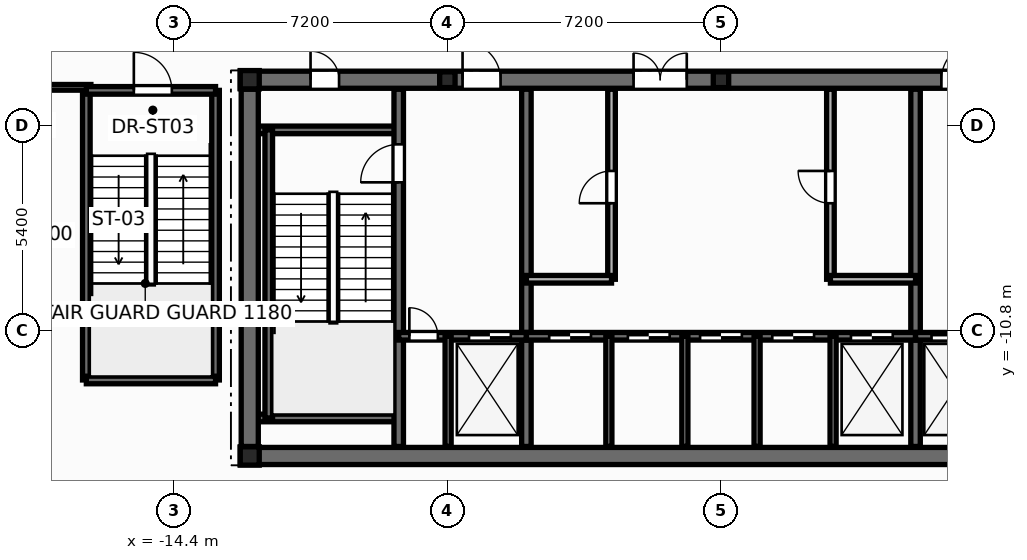
"""IFC4 building model, lengths in metres.
Left out: names, types, materials, properties, quantities, classifications, styles, units other than length and angle.
Written with IfcOpenShell. Run it as: python <this file> out.ifc"""

import sys

from ifc_helpers import new_model, si_unit, direction, frame, frame_2d, origin, origin_2d, place, context, subcontext, project, spatial, rectangle, i_section, extrude, element, fill, save


model = new_model("IFC4")
c1 = context("Model", 3, precision=1e-05, world=origin(), true_north=direction((0.0, 1.0)))
c2 = subcontext(c1, "Body", "Model", "MODEL_VIEW")
j1 = project(units=[si_unit("LENGTHUNIT", "METRE"), si_unit("PLANEANGLEUNIT", "RADIAN")], contexts=[c1])
p1 = place(None, origin())
s1 = spatial("IfcSite", under=j1, at=p1, CompositionType="ELEMENT")
p2 = place(p1, origin())
s2 = spatial("IfcBuilding", under=s1, at=p2, CompositionType="ELEMENT")
p3 = place(p2, frame((0.0, 0.0, -4.8)))
s3 = spatial("IfcBuildingStorey", under=s2, at=p3, CompositionType="ELEMENT", Elevation=-4.8)
for number, where, z_axis, x_axis in (
    (1, (-12.4, -14.1, 0.0), (0.0, 0.0, 1.0), (1.0, 0.0, 0.0)),
    (2, (-12.4, -4.2, 0.0), (0.0, 0.0, 1.0), (1.0, 0.0, 0.0)),
):
    element("IfcColumn", number, at=place(p3, frame(where, z_axis=z_axis, x_axis=x_axis)), inside=s3, PredefinedType="COLUMN", context=c2, shape_type="SweptSolid", body=[
        extrude(i_section(OverallWidth=0.5, OverallDepth=0.482, WebThickness=0.04, FlangeThickness=0.045, at=origin_2d()), origin(), (0.0, 0.0, 1.0), 4.8),
    ])
for number, where, z_axis, x_axis in (
    (3, (-7.2, -4.2, 0.0), (0.0, 0.0, 1.0), (1.0, 0.0, 0.0)),
    (4, (0.0, -4.2, 0.0), (0.0, 0.0, 1.0), (1.0, 0.0, 0.0)),
):
    element("IfcColumn", number, at=place(p3, frame(where, z_axis=z_axis, x_axis=x_axis)), inside=s3, PredefinedType="PILASTER", context=c2, shape_type="SweptSolid", body=[
        extrude(i_section(OverallWidth=0.405, OverallDepth=0.414, WebThickness=0.022, FlangeThickness=0.032, at=origin_2d()), origin(), (0.0, 0.0, 1.0), 4.8),
    ])
p4 = place(p3, frame((-12.65, -14.1, 0.0), z_axis=(0.0, 0.0, 1.0), x_axis=(1.0, 0.0, 0.0)))
e5 = element("IfcWall", 5, at=p4, inside=s3, PredefinedType="SHEAR", context=c2, shape_type="SweptSolid", body=[
    extrude(rectangle(XDim=25.3, YDim=0.45, at=frame_2d((12.65, 0.0))), origin(), (0.0, 0.0, 1.0), 4.8),
])
p5 = place(p3, frame((-12.65, -4.2, 0.0), z_axis=(0.0, 0.0, 1.0), x_axis=(1.0, 0.0, 0.0)))
e6 = element("IfcWall", 6, at=p5, inside=s3, PredefinedType="SHEAR", context=c2, shape_type="SweptSolid", body=[
    extrude(rectangle(XDim=25.3, YDim=0.45, at=frame_2d((12.65, 0.0))), origin(), (0.0, 0.0, 1.0), 4.8),
])
p6 = place(p5, frame((1.85, 0.0, 0.0)))
e7 = element("IfcOpeningElement", 7, at=p6, cuts=e6, PredefinedType="OPENING", context=c2, shape_type="SweptSolid", body=[
    extrude(rectangle(XDim=0.756, YDim=2.054, at=frame_2d((0.375, 1.027))), frame((0.0, 0.235, 0.0), z_axis=(0.0, -1.0, 0.0), x_axis=(1.0, 0.0, 0.0)), (0.0, 0.0, 1.0), 0.47),
])
p7 = place(p5, frame((22.65, 0.0, 0.0)))
e8 = element("IfcOpeningElement", 8, at=p7, cuts=e6, PredefinedType="OPENING", context=c2, shape_type="SweptSolid", body=[
    extrude(rectangle(XDim=0.756, YDim=2.054, at=frame_2d((0.375, 1.027))), frame((0.0, 0.235, 0.0), z_axis=(0.0, -1.0, 0.0), x_axis=(1.0, 0.0, 0.0)), (0.0, 0.0, 1.0), 0.47),
])
p8 = place(p5, frame((5.85, 0.0, 0.0)))
e9 = element("IfcOpeningElement", 9, at=p8, cuts=e6, PredefinedType="OPENING", context=c2, shape_type="SweptSolid", body=[
    extrude(rectangle(XDim=1.006, YDim=2.104, at=frame_2d((0.5, 1.052))), frame((0.0, 0.235, 0.0), z_axis=(0.0, -1.0, 0.0), x_axis=(1.0, 0.0, 0.0)), (0.0, 0.0, 1.0), 0.47),
])
p9 = place(p5, frame((10.35, 0.0, 0.0)))
e10 = element("IfcOpeningElement", 10, at=p9, cuts=e6, PredefinedType="OPENING", context=c2, shape_type="SweptSolid", body=[
    extrude(rectangle(XDim=1.406, YDim=2.154, at=frame_2d((0.7, 1.077))), frame((0.0, 0.235, 0.0), z_axis=(0.0, -1.0, 0.0), x_axis=(1.0, 0.0, 0.0)), (0.0, 0.0, 1.0), 0.47),
])
p10 = place(p5, frame((18.45, 0.0, 0.0)))
e11 = element("IfcOpeningElement", 11, at=p10, cuts=e6, PredefinedType="OPENING", context=c2, shape_type="SweptSolid", body=[
    extrude(rectangle(XDim=1.006, YDim=2.104, at=frame_2d((0.5, 1.052))), frame((0.0, 0.235, 0.0), z_axis=(0.0, -1.0, 0.0), x_axis=(1.0, 0.0, 0.0)), (0.0, 0.0, 1.0), 0.47),
])
for number, where, z_axis, x_axis in (
    (12, (-12.35, -5.52, 0.0), (0.0, 0.0, 1.0), (1.0, 0.0, 0.0)),
    (13, (-12.35, -13.1, 0.0), (0.0, 0.0, 1.0), (1.0, 0.0, 0.0)),
):
    element("IfcWall", number, at=place(p3, frame(where, z_axis=z_axis, x_axis=x_axis)), inside=s3, PredefinedType="SOLIDWALL", context=c2, shape_type="SweptSolid", body=[
        extrude(rectangle(XDim=3.87, YDim=0.2, at=frame_2d((1.935, 0.0))), origin(), (0.0, 0.0, 1.0), 4.8),
    ])
p11 = place(p3, frame((-11.9, -13.1, 0.0), z_axis=(0.0, 0.0, 1.0), x_axis=(0.0, 1.0, 0.0)))
e14 = element("IfcWall", 14, at=p11, inside=s3, PredefinedType="SOLIDWALL", context=c2, shape_type="SweptSolid", body=[
    extrude(rectangle(XDim=7.58, YDim=0.2, at=frame_2d((3.79, 0.0))), origin(), (0.0, 0.0, 1.0), 4.8),
])
p12 = place(p3, frame((-8.48, -13.85, 0.0), z_axis=(0.0, 0.0, 1.0), x_axis=(0.0, 1.0, 0.0)))
e15 = element("IfcWall", 15, at=p12, inside=s3, PredefinedType="SHEAR", context=c2, shape_type="SweptSolid", body=[
    extrude(rectangle(XDim=9.4, YDim=0.25, at=frame_2d((4.7, 0.0))), origin(), (0.0, 0.0, 1.0), 4.8),
])
p13 = place(p12, frame((6.95, 0.0, 0.0)))
e16 = element("IfcOpeningElement", 16, at=p13, cuts=e15, PredefinedType="OPENING", context=c2, shape_type="SweptSolid", body=[
    extrude(rectangle(XDim=1.006, YDim=2.104, at=frame_2d((0.5, 1.052))), frame((0.0, 0.135, 0.0), z_axis=(0.0, -1.0, 0.0), x_axis=(1.0, 0.0, 0.0)), (0.0, 0.0, 1.0), 0.27),
])
for number, where, z_axis, x_axis in (
    (17, (-5.12, -13.85, 0.0), (0.0, 0.0, 1.0), (0.0, 1.0, 0.0)),
    (18, (5.12, -13.85, 0.0), (0.0, 0.0, 1.0), (0.0, 1.0, 0.0)),
):
    element("IfcWall", number, at=place(p3, frame(where, z_axis=z_axis, x_axis=x_axis)), inside=s3, PredefinedType="SHEAR", context=c2, shape_type="SweptSolid", body=[
        extrude(rectangle(XDim=9.4, YDim=0.25, at=frame_2d((4.7, 0.0))), origin(), (0.0, 0.0, 1.0), 4.8),
    ])
p14 = place(p3, frame((-8.48, -10.95, 0.0), z_axis=(0.0, 0.0, 1.0), x_axis=(1.0, 0.0, 0.0)))
e19 = element("IfcWall", 19, at=p14, inside=s3, PredefinedType="SOLIDWALL", context=c2, shape_type="SweptSolid", body=[
    extrude(rectangle(XDim=3.36, YDim=0.2, at=frame_2d((1.68, 0.0))), origin(), (0.0, 0.0, 1.0), 4.8),
])
p15 = place(p14, frame((0.28, 0.0, 0.0)))
e20 = element("IfcOpeningElement", 20, at=p15, cuts=e19, PredefinedType="OPENING", context=c2, shape_type="SweptSolid", body=[
    extrude(rectangle(XDim=0.756, YDim=2.054, at=frame_2d((0.375, 1.027))), frame((0.0, 0.11, 0.0), z_axis=(0.0, -1.0, 0.0), x_axis=(1.0, 0.0, 0.0)), (0.0, 0.0, 1.0), 0.22),
])
p16 = place(p14, frame((1.85, 0.0, 0.0)))
e21 = element("IfcOpeningElement", 21, at=p16, cuts=e19, PredefinedType="OPENING", context=c2, shape_type="SweptSolid", body=[
    extrude(rectangle(XDim=1.106, YDim=2.104, at=frame_2d((0.55, 1.052))), frame((0.0, 0.11, 0.0), z_axis=(0.0, -1.0, 0.0), x_axis=(1.0, 0.0, 0.0)), (0.0, 0.0, 1.0), 0.22),
])
p17 = place(p3, frame((-5.12, -10.95, 0.0), z_axis=(0.0, 0.0, 1.0), x_axis=(1.0, 0.0, 0.0)))
e22 = element("IfcWall", 22, at=p17, inside=s3, PredefinedType="SOLIDWALL", context=c2, shape_type="SweptSolid", body=[
    extrude(rectangle(XDim=10.24, YDim=0.2, at=frame_2d((5.12, 0.0))), origin(), (0.0, 0.0, 1.0), 4.8),
])
p18 = place(p17, frame((0.6, 0.0, 0.0)))
e23 = element("IfcOpeningElement", 23, at=p18, cuts=e22, PredefinedType="OPENING", context=c2, shape_type="SweptSolid", body=[
    extrude(rectangle(XDim=1.106, YDim=2.104, at=frame_2d((0.55, 1.052))), frame((0.0, 0.11, 0.0), z_axis=(0.0, -1.0, 0.0), x_axis=(1.0, 0.0, 0.0)), (0.0, 0.0, 1.0), 0.22),
])
p19 = place(p17, frame((2.67, 0.0, 0.0)))
e24 = element("IfcOpeningElement", 24, at=p19, cuts=e22, PredefinedType="OPENING", context=c2, shape_type="SweptSolid", body=[
    extrude(rectangle(XDim=1.106, YDim=2.104, at=frame_2d((0.55, 1.052))), frame((0.0, 0.11, 0.0), z_axis=(0.0, -1.0, 0.0), x_axis=(1.0, 0.0, 0.0)), (0.0, 0.0, 1.0), 0.22),
])
p20 = place(p17, frame((4.57, 0.0, 0.0)))
e25 = element("IfcOpeningElement", 25, at=p20, cuts=e22, PredefinedType="OPENING", context=c2, shape_type="SweptSolid", body=[
    extrude(rectangle(XDim=1.106, YDim=2.104, at=frame_2d((0.55, 1.052))), frame((0.0, 0.11, 0.0), z_axis=(0.0, -1.0, 0.0), x_axis=(1.0, 0.0, 0.0)), (0.0, 0.0, 1.0), 0.22),
])
p21 = place(p17, frame((6.47, 0.0, 0.0)))
e26 = element("IfcOpeningElement", 26, at=p21, cuts=e22, PredefinedType="OPENING", context=c2, shape_type="SweptSolid", body=[
    extrude(rectangle(XDim=1.106, YDim=2.104, at=frame_2d((0.55, 1.052))), frame((0.0, 0.11, 0.0), z_axis=(0.0, -1.0, 0.0), x_axis=(1.0, 0.0, 0.0)), (0.0, 0.0, 1.0), 0.22),
])
p22 = place(p17, frame((8.54, 0.0, 0.0)))
e27 = element("IfcOpeningElement", 27, at=p22, cuts=e22, PredefinedType="OPENING", context=c2, shape_type="SweptSolid", body=[
    extrude(rectangle(XDim=1.106, YDim=2.104, at=frame_2d((0.55, 1.052))), frame((0.0, 0.11, 0.0), z_axis=(0.0, -1.0, 0.0), x_axis=(1.0, 0.0, 0.0)), (0.0, 0.0, 1.0), 0.22),
])
p23 = place(p3, frame((5.12, -10.95, 0.0), z_axis=(0.0, 0.0, 1.0), x_axis=(1.0, 0.0, 0.0)))
e28 = element("IfcWall", 28, at=p23, inside=s3, PredefinedType="SOLIDWALL", context=c2, shape_type="SweptSolid", body=[
    extrude(rectangle(XDim=3.36, YDim=0.2, at=frame_2d((1.68, 0.0))), origin(), (0.0, 0.0, 1.0), 4.8),
])
p24 = place(p23, frame((0.42, 0.0, 0.0)))
e29 = element("IfcOpeningElement", 29, at=p24, cuts=e28, PredefinedType="OPENING", context=c2, shape_type="SweptSolid", body=[
    extrude(rectangle(XDim=1.106, YDim=2.104, at=frame_2d((0.55, 1.052))), frame((0.0, 0.11, 0.0), z_axis=(0.0, -1.0, 0.0), x_axis=(1.0, 0.0, 0.0)), (0.0, 0.0, 1.0), 0.22),
])
p25 = place(p23, frame((2.3, 0.0, 0.0)))
e30 = element("IfcOpeningElement", 30, at=p25, cuts=e28, PredefinedType="OPENING", context=c2, shape_type="SweptSolid", body=[
    extrude(rectangle(XDim=0.756, YDim=2.054, at=frame_2d((0.375, 1.027))), frame((0.0, 0.11, 0.0), z_axis=(0.0, -1.0, 0.0), x_axis=(1.0, 0.0, 0.0)), (0.0, 0.0, 1.0), 0.22),
])
for number, where, z_axis, x_axis in (
    (31, (-7.18, -13.85, 0.0), (0.0, 0.0, 1.0), (0.0, 1.0, 0.0)),
    (32, (-2.95, -13.85, 0.0), (0.0, 0.0, 1.0), (0.0, 1.0, 0.0)),
    (33, (2.95, -13.85, 0.0), (0.0, 0.0, 1.0), (0.0, 1.0, 0.0)),
):
    element("IfcWall", number, at=place(p3, frame(where, z_axis=z_axis, x_axis=x_axis)), inside=s3, PredefinedType="PARTITIONING", context=c2, shape_type="SweptSolid", body=[
        extrude(rectangle(XDim=2.9, YDim=0.16, at=frame_2d((1.45, 0.0))), origin(), (0.0, 0.0, 1.0), 3.505),
    ])
p26 = place(p3, frame((-12.4, -13.85, 0.0), z_axis=(0.0, 0.0, 1.0), x_axis=(0.0, 1.0, 0.0)))
e34 = element("IfcWall", 34, at=p26, inside=s3, PredefinedType="SHEAR", context=c2, shape_type="SweptSolid", body=[
    extrude(rectangle(XDim=9.4, YDim=0.45, at=frame_2d((4.7, 0.0))), origin(), (0.0, 0.0, 1.0), 4.8),
])
p27 = place(p3, frame((-2.88, -9.45, 0.0), z_axis=(0.0, 0.0, 1.0), x_axis=(0.0, 1.0, 0.0)))
e35 = element("IfcWall", 35, at=p27, inside=s3, PredefinedType="SOLIDWALL", context=c2, shape_type="SweptSolid", body=[
    extrude(rectangle(XDim=5.0, YDim=0.2, at=frame_2d((2.5, 0.0))), origin(), (0.0, 0.0, 1.0), 4.48),
])
p28 = place(p27, frame((2.0, 0.0, 0.0)))
e36 = element("IfcOpeningElement", 36, at=p28, cuts=e35, PredefinedType="OPENING", context=c2, shape_type="SweptSolid", body=[
    extrude(rectangle(XDim=0.856, YDim=2.054, at=frame_2d((0.425, 1.027))), frame((0.0, 0.11, 0.0), z_axis=(0.0, -1.0, 0.0), x_axis=(1.0, 0.0, 0.0)), (0.0, 0.0, 1.0), 0.22),
])
p29 = place(p3, frame((-5.12, -9.45, 0.0), z_axis=(0.0, 0.0, 1.0), x_axis=(1.0, 0.0, 0.0)))
e37 = element("IfcWall", 37, at=p29, inside=s3, PredefinedType="SOLIDWALL", context=c2, shape_type="SweptSolid", body=[
    extrude(rectangle(XDim=2.24, YDim=0.2, at=frame_2d((1.12, 0.0))), origin(), (0.0, 0.0, 1.0), 4.48),
])
p30 = place(p3, frame((2.88, -9.45, 0.0), z_axis=(0.0, 0.0, 1.0), x_axis=(0.0, 1.0, 0.0)))
e38 = element("IfcWall", 38, at=p30, inside=s3, PredefinedType="SOLIDWALL", context=c2, shape_type="SweptSolid", body=[
    extrude(rectangle(XDim=5.0, YDim=0.2, at=frame_2d((2.5, 0.0))), origin(), (0.0, 0.0, 1.0), 4.48),
])
p31 = place(p30, frame((2.0, 0.0, 0.0)))
e39 = element("IfcOpeningElement", 39, at=p31, cuts=e38, PredefinedType="OPENING", context=c2, shape_type="SweptSolid", body=[
    extrude(rectangle(XDim=0.856, YDim=2.054, at=frame_2d((0.425, 1.027))), frame((0.0, 0.11, 0.0), z_axis=(0.0, -1.0, 0.0), x_axis=(1.0, 0.0, 0.0)), (0.0, 0.0, 1.0), 0.22),
])
p32 = place(p3, frame((2.88, -9.45, 0.0), z_axis=(0.0, 0.0, 1.0), x_axis=(1.0, 0.0, 0.0)))
e40 = element("IfcWall", 40, at=p32, inside=s3, PredefinedType="SOLIDWALL", context=c2, shape_type="SweptSolid", body=[
    extrude(rectangle(XDim=2.24, YDim=0.2, at=frame_2d((1.12, 0.0))), origin(), (0.0, 0.0, 1.0), 4.48),
])
for number, where, z_axis, x_axis in (
    (41, (-0.95, -13.85, 0.0), (0.0, 0.0, 1.0), (0.0, 1.0, 0.0)),
    (42, (0.95, -13.85, 0.0), (0.0, 0.0, 1.0), (0.0, 1.0, 0.0)),
):
    element("IfcWall", number, at=place(p3, frame(where, z_axis=z_axis, x_axis=x_axis)), inside=s3, PredefinedType="PARTITIONING", context=c2, shape_type="SweptSolid", body=[
        extrude(rectangle(XDim=2.9, YDim=0.16, at=frame_2d((1.45, 0.0))), origin(), (0.0, 0.0, 1.0), 3.505),
    ])
for number, where, z_axis, x_axis in (
    (43, (-16.7, -12.1, 0.0), (0.0, 0.0, 1.0), (0.0, 1.0, 0.0)),
    (44, (-13.3, -12.1, 0.0), (0.0, 0.0, 1.0), (0.0, 1.0, 0.0)),
):
    element("IfcWall", number, at=place(p3, frame(where, z_axis=z_axis, x_axis=x_axis)), inside=s3, PredefinedType="SOLIDWALL", context=c2, shape_type="SweptSolid", body=[
        extrude(rectangle(XDim=7.62, YDim=0.2, at=frame_2d((3.81, 0.0))), origin(), (0.0, 0.0, 1.0), 4.8),
    ])
p33 = place(p3, frame((-22.912, -4.4, 0.0), z_axis=(0.0, 0.0, 1.0), x_axis=(1.0, 0.0, 0.0)))
e45 = element("IfcWall", 45, at=p33, inside=s3, PredefinedType="PARTITIONING", context=c2, shape_type="SweptSolid", body=[
    extrude(rectangle(XDim=6.332, YDim=0.15, at=frame_2d((3.166, 0.0))), origin(), (0.0, 0.0, 1.0), 3.844),
])
p34 = place(p33, frame((3.493, 0.0, 0.0)))
e46 = element("IfcOpeningElement", 46, at=p34, cuts=e45, PredefinedType="OPENING", context=c2, shape_type="SweptSolid", body=[
    extrude(rectangle(XDim=0.956, YDim=2.104, at=frame_2d((0.475, 1.052))), frame((0.0, 0.085, 0.0), z_axis=(0.0, -1.0, 0.0), x_axis=(1.0, 0.0, 0.0)), (0.0, 0.0, 1.0), 0.17),
])
p35 = place(p3, frame((-16.7, -12.1, 0.0), z_axis=(0.0, 0.0, 1.0), x_axis=(1.0, 0.0, 0.0)))
e47 = element("IfcWall", 47, at=p35, inside=s3, PredefinedType="SOLIDWALL", context=c2, shape_type="SweptSolid", body=[
    extrude(rectangle(XDim=3.4, YDim=0.2, at=frame_2d((1.7, 0.0))), origin(), (0.0, 0.0, 1.0), 4.8),
])
p36 = place(p3, frame((-16.7, -4.48, 0.0), z_axis=(0.0, 0.0, 1.0), x_axis=(1.0, 0.0, 0.0)))
e48 = element("IfcWall", 48, at=p36, inside=s3, PredefinedType="SOLIDWALL", context=c2, shape_type="SweptSolid", body=[
    extrude(rectangle(XDim=3.4, YDim=0.2, at=frame_2d((1.7, 0.0))), origin(), (0.0, 0.0, 1.0), 4.8),
])
p37 = place(p36, frame((1.25, 0.0, 0.0)))
e49 = element("IfcOpeningElement", 49, at=p37, cuts=e48, PredefinedType="OPENING", context=c2, shape_type="SweptSolid", body=[
    extrude(rectangle(XDim=1.006, YDim=2.104, at=frame_2d((0.5, 1.052))), frame((0.0, 0.11, 0.0), z_axis=(0.0, -1.0, 0.0), x_axis=(1.0, 0.0, 0.0)), (0.0, 0.0, 1.0), 0.22),
])
p38 = place(p28, origin())
e50 = element("IfcDoor", 50, at=p38, inside=s3, OperationType="SINGLE_SWING_LEFT", PredefinedType="DOOR", context=c2, shape_type="SweptSolid", body=[
    extrude(rectangle(XDim=0.85, YDim=2.05, at=frame_2d((0.425, 1.025))), frame((0.0, 0.025, 0.0), z_axis=(0.0, -1.0, 0.0), x_axis=(1.0, 0.0, 0.0)), (0.0, 0.0, 1.0), 0.05),
])
fill(e36, e50)
p39 = place(p31, origin())
e51 = element("IfcDoor", 51, at=p39, inside=s3, OperationType="SINGLE_SWING_RIGHT", PredefinedType="DOOR", context=c2, shape_type="SweptSolid", body=[
    extrude(rectangle(XDim=0.85, YDim=2.05, at=frame_2d((0.425, 1.025))), frame((0.0, 0.025, 0.0), z_axis=(0.0, -1.0, 0.0), x_axis=(1.0, 0.0, 0.0)), (0.0, 0.0, 1.0), 0.05),
])
fill(e39, e51)
p40 = place(p13, origin())
e52 = element("IfcDoor", 52, at=p40, inside=s3, OperationType="SINGLE_SWING_LEFT", PredefinedType="DOOR", context=c2, shape_type="SweptSolid", body=[
    extrude(rectangle(XDim=1.0, YDim=2.1, at=frame_2d((0.5, 1.05))), frame((0.0, 0.025, 0.0), z_axis=(0.0, -1.0, 0.0), x_axis=(1.0, 0.0, 0.0)), (0.0, 0.0, 1.0), 0.05),
])
fill(e16, e52)
p41 = place(p15, origin())
e53 = element("IfcDoor", 53, at=p41, inside=s3, OperationType="SINGLE_SWING_LEFT", PredefinedType="DOOR", context=c2, shape_type="SweptSolid", body=[
    extrude(rectangle(XDim=0.75, YDim=2.05, at=frame_2d((0.375, 1.025))), frame((0.0, 0.025, 0.0), z_axis=(0.0, -1.0, 0.0), x_axis=(1.0, 0.0, 0.0)), (0.0, 0.0, 1.0), 0.05),
])
fill(e20, e53)
p42 = place(p16, origin())
e54 = element("IfcDoor", 54, at=p42, inside=s3, OperationType="DOUBLE_DOOR_SLIDING", PredefinedType="DOOR", context=c2, shape_type="SweptSolid", body=[
    extrude(rectangle(XDim=1.1, YDim=2.1, at=frame_2d((0.55, 1.05))), frame((0.0, 0.025, 0.0), z_axis=(0.0, -1.0, 0.0), x_axis=(1.0, 0.0, 0.0)), (0.0, 0.0, 1.0), 0.05),
])
fill(e21, e54)
p43 = place(p24, origin())
e55 = element("IfcDoor", 55, at=p43, inside=s3, OperationType="DOUBLE_DOOR_SLIDING", PredefinedType="DOOR", context=c2, shape_type="SweptSolid", body=[
    extrude(rectangle(XDim=1.1, YDim=2.1, at=frame_2d((0.55, 1.05))), frame((0.0, 0.025, 0.0), z_axis=(0.0, -1.0, 0.0), x_axis=(1.0, 0.0, 0.0)), (0.0, 0.0, 1.0), 0.05),
])
fill(e29, e55)
p44 = place(p18, origin())
e56 = element("IfcDoor", 56, at=p44, inside=s3, OperationType="DOUBLE_DOOR_SLIDING", PredefinedType="DOOR", context=c2, shape_type="SweptSolid", body=[
    extrude(rectangle(XDim=1.1, YDim=2.1, at=frame_2d((0.55, 1.05))), frame((0.0, 0.025, 0.0), z_axis=(0.0, -1.0, 0.0), x_axis=(1.0, 0.0, 0.0)), (0.0, 0.0, 1.0), 0.05),
])
fill(e23, e56)
p45 = place(p19, origin())
e57 = element("IfcDoor", 57, at=p45, inside=s3, OperationType="DOUBLE_DOOR_SLIDING", PredefinedType="DOOR", context=c2, shape_type="SweptSolid", body=[
    extrude(rectangle(XDim=1.1, YDim=2.1, at=frame_2d((0.55, 1.05))), frame((0.0, 0.025, 0.0), z_axis=(0.0, -1.0, 0.0), x_axis=(1.0, 0.0, 0.0)), (0.0, 0.0, 1.0), 0.05),
])
fill(e24, e57)
p46 = place(p20, origin())
e58 = element("IfcDoor", 58, at=p46, inside=s3, OperationType="DOUBLE_DOOR_SLIDING", PredefinedType="DOOR", context=c2, shape_type="SweptSolid", body=[
    extrude(rectangle(XDim=1.1, YDim=2.1, at=frame_2d((0.55, 1.05))), frame((0.0, 0.025, 0.0), z_axis=(0.0, -1.0, 0.0), x_axis=(1.0, 0.0, 0.0)), (0.0, 0.0, 1.0), 0.05),
])
fill(e25, e58)
p47 = place(p21, origin())
e59 = element("IfcDoor", 59, at=p47, inside=s3, OperationType="DOUBLE_DOOR_SLIDING", PredefinedType="DOOR", context=c2, shape_type="SweptSolid", body=[
    extrude(rectangle(XDim=1.1, YDim=2.1, at=frame_2d((0.55, 1.05))), frame((0.0, 0.025, 0.0), z_axis=(0.0, -1.0, 0.0), x_axis=(1.0, 0.0, 0.0)), (0.0, 0.0, 1.0), 0.05),
])
fill(e26, e59)
p48 = place(p22, origin())
e60 = element("IfcDoor", 60, at=p48, inside=s3, OperationType="DOUBLE_DOOR_SLIDING", PredefinedType="DOOR", context=c2, shape_type="SweptSolid", body=[
    extrude(rectangle(XDim=1.1, YDim=2.1, at=frame_2d((0.55, 1.05))), frame((0.0, 0.025, 0.0), z_axis=(0.0, -1.0, 0.0), x_axis=(1.0, 0.0, 0.0)), (0.0, 0.0, 1.0), 0.05),
])
fill(e27, e60)
p49 = place(p6, origin())
e61 = element("IfcDoor", 61, at=p49, inside=s3, OperationType="SINGLE_SWING_LEFT", PredefinedType="DOOR", context=c2, shape_type="SweptSolid", body=[
    extrude(rectangle(XDim=0.75, YDim=2.05, at=frame_2d((0.375, 1.025))), frame((0.0, 0.025, 0.0), z_axis=(0.0, -1.0, 0.0), x_axis=(1.0, 0.0, 0.0)), (0.0, 0.0, 1.0), 0.05),
])
fill(e7, e61)
p50 = place(p8, origin())
e62 = element("IfcDoor", 62, at=p50, inside=s3, OperationType="SINGLE_SWING_LEFT", PredefinedType="DOOR", context=c2, shape_type="SweptSolid", body=[
    extrude(rectangle(XDim=1.0, YDim=2.1, at=frame_2d((0.5, 1.05))), frame((0.0, 0.025, 0.0), z_axis=(0.0, -1.0, 0.0), x_axis=(1.0, 0.0, 0.0)), (0.0, 0.0, 1.0), 0.05),
])
fill(e9, e62)
p51 = place(p9, origin())
e63 = element("IfcDoor", 63, at=p51, inside=s3, OperationType="DOUBLE_DOOR_SINGLE_SWING", PredefinedType="DOOR", context=c2, shape_type="SweptSolid", body=[
    extrude(rectangle(XDim=1.4, YDim=2.15, at=frame_2d((0.7, 1.075))), frame((0.0, 0.025, 0.0), z_axis=(0.0, -1.0, 0.0), x_axis=(1.0, 0.0, 0.0)), (0.0, 0.0, 1.0), 0.05),
])
fill(e10, e63)
p52 = place(p10, origin())
e64 = element("IfcDoor", 64, at=p52, inside=s3, OperationType="SINGLE_SWING_RIGHT", PredefinedType="DOOR", context=c2, shape_type="SweptSolid", body=[
    extrude(rectangle(XDim=1.0, YDim=2.1, at=frame_2d((0.5, 1.05))), frame((0.0, 0.025, 0.0), z_axis=(0.0, -1.0, 0.0), x_axis=(1.0, 0.0, 0.0)), (0.0, 0.0, 1.0), 0.05),
])
fill(e11, e64)
p53 = place(p37, origin())
e65 = element("IfcDoor", 65, at=p53, inside=s3, OperationType="SINGLE_SWING_LEFT", PredefinedType="DOOR", context=c2, shape_type="SweptSolid", body=[
    extrude(rectangle(XDim=1.0, YDim=2.1, at=frame_2d((0.5, 1.05))), frame((0.0, 0.025, 0.0), z_axis=(0.0, -1.0, 0.0), x_axis=(1.0, 0.0, 0.0)), (0.0, 0.0, 1.0), 0.05),
])
fill(e49, e65)
save(model, sys.argv[1])
